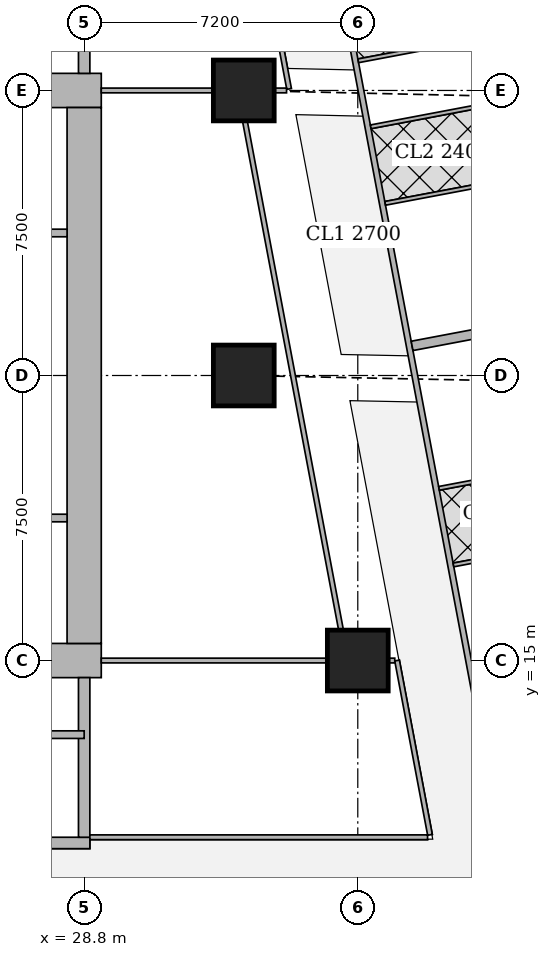
"""IFC4 building model, lengths in metres.
Left out: names, types, materials, properties, quantities, classifications, styles, units other than length and angle.
Written with IfcOpenShell. Run it as: python <this file> out.ifc"""

import sys

from ifc_helpers import new_model, si_unit, direction, frame, frame_2d, origin, origin_2d, place, context, subcontext, project, spatial, rectangle, extrude, element, fill, save


model = new_model("IFC4")
c1 = context("Model", 3, precision=1e-05, world=origin(), true_north=direction((0.0, 1.0)))
c2 = subcontext(c1, "Body", "Model", "MODEL_VIEW")
j1 = project(units=[si_unit("LENGTHUNIT", "METRE"), si_unit("PLANEANGLEUNIT", "RADIAN")], contexts=[c1])
p1 = place(None, origin())
s1 = spatial("IfcSite", under=j1, at=p1, CompositionType="ELEMENT")
p2 = place(p1, origin())
s2 = spatial("IfcBuilding", under=s1, at=p2, CompositionType="ELEMENT")
p3 = place(p2, frame((0.0, 0.0, 111.65)))
s3 = spatial("IfcBuildingStorey", under=s2, at=p3, CompositionType="ELEMENT", Elevation=111.65)
for number, where, z_axis, x_axis in (
    (1, (36.0, 15.0, 0.0), (0.0, 0.0, 1.0), (1.0, 0.0, 0.0)),
    (2, (33.0, 22.5, 0.0), (0.0, 0.0, 1.0), (1.0, 0.0, 0.0)),
    (3, (33.0, 30.0, 0.0), (0.0, 0.0, 1.0), (1.0, 0.0, 0.0)),
):
    element("IfcColumn", number, at=place(p3, frame(where, z_axis=z_axis, x_axis=x_axis)), inside=s3, PredefinedType="COLUMN", context=c2, shape_type="SweptSolid", body=[
        extrude(rectangle(XDim=1.6, YDim=1.6, at=origin_2d()), origin(), (0.0, 0.0, 1.0), 3.75),
    ])
p4 = place(p3, frame((13.95, 15.0, 0.0), z_axis=(0.0, 0.0, 1.0), x_axis=(1.0, 0.0, 0.0)))
e4 = element("IfcWall", 4, at=p4, inside=s3, PredefinedType="SHEAR", context=c2, shape_type="SweptSolid", body=[
    extrude(rectangle(XDim=15.3, YDim=0.9, at=frame_2d((7.65, 0.0))), origin(), (0.0, 0.0, 1.0), 3.75),
])
p5 = place(p4, frame((4.45, 0.0, 0.0)))
e5 = element("IfcOpeningElement", 5, at=p5, cuts=e4, PredefinedType="OPENING", context=c2, shape_type="SweptSolid", body=[
    extrude(rectangle(XDim=1.8, YDim=2.1, at=frame_2d((0.9, 1.05))), frame((0.0, 0.46, 0.0), z_axis=(0.0, -1.0, 0.0), x_axis=(1.0, 0.0, 0.0)), (0.0, 0.0, 1.0), 0.92),
])
p6 = place(p4, frame((10.7, 0.0, 0.0)))
e6 = element("IfcOpeningElement", 6, at=p6, cuts=e4, PredefinedType="OPENING", context=c2, shape_type="SweptSolid", body=[
    extrude(rectangle(XDim=1.1, YDim=2.1, at=frame_2d((0.55, 1.05))), frame((0.0, 0.46, 0.0), z_axis=(0.0, -1.0, 0.0), x_axis=(1.0, 0.0, 0.0)), (0.0, 0.0, 1.0), 0.92),
])
p7 = place(p3, frame((13.95, 30.0, 0.0), z_axis=(0.0, 0.0, 1.0), x_axis=(1.0, 0.0, 0.0)))
e7 = element("IfcWall", 7, at=p7, inside=s3, PredefinedType="SHEAR", context=c2, shape_type="SweptSolid", body=[
    extrude(rectangle(XDim=15.3, YDim=0.9, at=frame_2d((7.65, 0.0))), origin(), (0.0, 0.0, 1.0), 3.75),
])
p8 = place(p7, frame((4.45, 0.0, 0.0)))
e8 = element("IfcOpeningElement", 8, at=p8, cuts=e7, PredefinedType="OPENING", context=c2, shape_type="SweptSolid", body=[
    extrude(rectangle(XDim=1.8, YDim=2.1, at=frame_2d((0.9, 1.05))), frame((0.0, 0.46, 0.0), z_axis=(0.0, -1.0, 0.0), x_axis=(1.0, 0.0, 0.0)), (0.0, 0.0, 1.0), 0.92),
])
p9 = place(p7, frame((10.7, 0.0, 0.0)))
e9 = element("IfcOpeningElement", 9, at=p9, cuts=e7, PredefinedType="OPENING", context=c2, shape_type="SweptSolid", body=[
    extrude(rectangle(XDim=1.1, YDim=2.1, at=frame_2d((0.55, 1.05))), frame((0.0, 0.46, 0.0), z_axis=(0.0, -1.0, 0.0), x_axis=(1.0, 0.0, 0.0)), (0.0, 0.0, 1.0), 0.92),
])
p10 = place(p3, frame((28.8, 15.45, 0.0), z_axis=(0.0, 0.0, 1.0), x_axis=(0.0, 1.0, 0.0)))
e10 = element("IfcWall", 10, at=p10, inside=s3, PredefinedType="SHEAR", context=c2, shape_type="SweptSolid", body=[
    extrude(rectangle(XDim=14.1, YDim=0.9, at=frame_2d((7.05, 0.0))), origin(), (0.0, 0.0, 1.0), 3.75),
])
p11 = place(p3, frame((21.45, 10.2, 0.0), z_axis=(0.0, 0.0, 1.0), x_axis=(1.0, 0.0, 0.0)))
e11 = element("IfcWall", 11, at=p11, inside=s3, PredefinedType="SHEAR", context=c2, shape_type="SweptSolid", body=[
    extrude(rectangle(XDim=7.5, YDim=0.3, at=frame_2d((3.75, 0.0))), origin(), (0.0, 0.0, 1.0), 3.75),
])
p12 = place(p11, frame((0.5, 0.0, 0.0)))
e12 = element("IfcOpeningElement", 12, at=p12, cuts=e11, PredefinedType="OPENING", context=c2, shape_type="SweptSolid", body=[
    extrude(rectangle(XDim=1.1, YDim=2.1, at=frame_2d((0.55, 1.05))), frame((0.0, 0.16, 0.0), z_axis=(0.0, -1.0, 0.0), x_axis=(1.0, 0.0, 0.0)), (0.0, 0.0, 1.0), 0.32),
])
for number, where, z_axis, x_axis in (
    (13, (28.8, 10.35, 0.0), (0.0, 0.0, 1.0), (0.0, 1.0, 0.0)),
    (14, (28.8, 30.45, 0.0), (0.0, 0.0, 1.0), (0.0, 1.0, 0.0)),
):
    element("IfcWall", number, at=place(p3, frame(where, z_axis=z_axis, x_axis=x_axis)), inside=s3, PredefinedType="SHEAR", context=c2, shape_type="SweptSolid", body=[
        extrude(rectangle(XDim=4.2, YDim=0.3, at=frame_2d((2.1, 0.0))), origin(), (0.0, 0.0, 1.0), 3.75),
    ])
p13 = place(p3, frame((33.127, 45.65, 0.0), z_axis=(0.0, 0.0, 1.0), x_axis=(0.185598547723, -0.98262565562, 0.0)))
e15 = element("IfcWall", 15, at=p13, inside=s3, PredefinedType="SOLIDWALL", context=c2, shape_type="SweptSolid", body=[
    extrude(rectangle(XDim=47.118, YDim=0.15, at=frame_2d((23.559, 0.0))), origin(), (0.0, 0.0, 1.0), 2.2),
])
p14 = place(p13, frame((20.373, 0.0, 0.0)))
e16 = element("IfcOpeningElement", 16, at=p14, cuts=e15, PredefinedType="OPENING", context=c2, shape_type="SweptSolid", body=[
    extrude(rectangle(XDim=1.0, YDim=2.1, at=frame_2d((0.5, 1.05))), frame((0.0, 0.085, 0.0), z_axis=(0.0, -1.0, 0.0), x_axis=(1.0, 0.0, 0.0)), (0.0, 0.0, 1.0), 0.17),
])
p15 = place(p13, frame((24.188, 0.0, 0.0)))
e17 = element("IfcOpeningElement", 17, at=p15, cuts=e15, PredefinedType="OPENING", context=c2, shape_type="SweptSolid", body=[
    extrude(rectangle(XDim=1.0, YDim=2.1, at=frame_2d((0.5, 1.05))), frame((0.0, 0.085, 0.0), z_axis=(0.0, -1.0, 0.0), x_axis=(1.0, 0.0, 0.0)), (0.0, 0.0, 1.0), 0.17),
])
p16 = place(p13, frame((32.608, 0.0, 0.0)))
e18 = element("IfcOpeningElement", 18, at=p16, cuts=e15, PredefinedType="OPENING", context=c2, shape_type="SweptSolid", body=[
    extrude(rectangle(XDim=1.0, YDim=2.1, at=frame_2d((0.5, 1.05))), frame((0.0, 0.085, 0.0), z_axis=(0.0, -1.0, 0.0), x_axis=(1.0, 0.0, 0.0)), (0.0, 0.0, 1.0), 0.17),
])
p17 = place(p3, frame((38.862, 41.42, 0.0), z_axis=(0.0, 0.0, 1.0), x_axis=(0.185550092293, -0.982634806655, 0.0)))
e19 = element("IfcWall", 19, at=p17, inside=s3, PredefinedType="PARTITIONING", context=c2, shape_type="SweptSolid", body=[
    extrude(rectangle(XDim=12.384, YDim=0.1, at=frame_2d((6.192, 0.0))), origin(), (0.0, 0.0, 1.0), 2.5),
])
p18 = place(p17, frame((11.212, 0.0, 0.0)))
e20 = element("IfcOpeningElement", 20, at=p18, cuts=e19, PredefinedType="OPENING", context=c2, shape_type="SweptSolid", body=[
    extrude(rectangle(XDim=0.9, YDim=2.1, at=frame_2d((0.45, 1.05))), frame((0.0, 0.06, 0.0), z_axis=(0.0, -1.0, 0.0), x_axis=(1.0, 0.0, 0.0)), (0.0, 0.0, 1.0), 0.12),
])
p19 = place(p17, frame((7.555, 0.0, 0.0)))
e21 = element("IfcOpeningElement", 21, at=p19, cuts=e19, PredefinedType="OPENING", context=c2, shape_type="SweptSolid", body=[
    extrude(rectangle(XDim=0.9, YDim=2.1, at=frame_2d((0.45, 1.05))), frame((0.0, 0.06, 0.0), z_axis=(0.0, -1.0, 0.0), x_axis=(1.0, 0.0, 0.0)), (0.0, 0.0, 1.0), 0.12),
])
p20 = place(p17, frame((3.579, 0.0, 0.0)))
e22 = element("IfcOpeningElement", 22, at=p20, cuts=e19, PredefinedType="OPENING", context=c2, shape_type="SweptSolid", body=[
    extrude(rectangle(XDim=0.9, YDim=2.1, at=frame_2d((0.45, 1.05))), frame((0.0, 0.06, 0.0), z_axis=(0.0, -1.0, 0.0), x_axis=(1.0, 0.0, 0.0)), (0.0, 0.0, 1.0), 0.12),
])
p21 = place(p3, frame((37.473, 42.309, 0.0), z_axis=(0.0, 0.0, 1.0), x_axis=(0.185583982986, -0.982628406499, 0.0)))
e23 = element("IfcWall", 23, at=p21, inside=s3, PredefinedType="PARTITIONING", context=c2, shape_type="SweptSolid", body=[
    extrude(rectangle(XDim=14.825, YDim=0.1, at=frame_2d((7.412, 0.0))), origin(), (0.0, 0.0, 1.0), 2.5),
])
p22 = place(p21, frame((13.4, 0.0, 0.0)))
e24 = element("IfcOpeningElement", 24, at=p22, cuts=e23, PredefinedType="OPENING", context=c2, shape_type="SweptSolid", body=[
    extrude(rectangle(XDim=0.9, YDim=2.1, at=frame_2d((0.45, 1.05))), frame((0.0, 0.06, 0.0), z_axis=(0.0, -1.0, 0.0), x_axis=(1.0, 0.0, 0.0)), (0.0, 0.0, 1.0), 0.12),
])
p23 = place(p21, frame((9.808, 0.0, 0.0)))
e25 = element("IfcOpeningElement", 25, at=p23, cuts=e23, PredefinedType="OPENING", context=c2, shape_type="SweptSolid", body=[
    extrude(rectangle(XDim=0.9, YDim=2.1, at=frame_2d((0.45, 1.05))), frame((0.0, 0.06, 0.0), z_axis=(0.0, -1.0, 0.0), x_axis=(1.0, 0.0, 0.0)), (0.0, 0.0, 1.0), 0.12),
])
p24 = place(p21, frame((5.397, 0.0, 0.0)))
e26 = element("IfcOpeningElement", 26, at=p24, cuts=e23, PredefinedType="OPENING", context=c2, shape_type="SweptSolid", body=[
    extrude(rectangle(XDim=0.9, YDim=2.1, at=frame_2d((0.45, 1.05))), frame((0.0, 0.06, 0.0), z_axis=(0.0, -1.0, 0.0), x_axis=(1.0, 0.0, 0.0)), (0.0, 0.0, 1.0), 0.12),
])
p25 = place(p21, frame((2.853, 0.0, 0.0)))
e27 = element("IfcOpeningElement", 27, at=p25, cuts=e23, PredefinedType="OPENING", context=c2, shape_type="SweptSolid", body=[
    extrude(rectangle(XDim=0.9, YDim=2.1, at=frame_2d((0.45, 1.05))), frame((0.0, 0.06, 0.0), z_axis=(0.0, -1.0, 0.0), x_axis=(1.0, 0.0, 0.0)), (0.0, 0.0, 1.0), 0.12),
])
p26 = place(p21, frame((11.491, 0.0, 0.0)))
e28 = element("IfcOpeningElement", 28, at=p26, cuts=e23, PredefinedType="OPENING", context=c2, shape_type="SweptSolid", body=[
    extrude(rectangle(XDim=0.9, YDim=2.1, at=frame_2d((0.45, 1.05))), frame((0.0, 0.06, 0.0), z_axis=(0.0, -1.0, 0.0), x_axis=(1.0, 0.0, 0.0)), (0.0, 0.0, 1.0), 0.12),
])
p27 = place(p21, frame((7.9, 0.0, 0.0)))
e29 = element("IfcOpeningElement", 29, at=p27, cuts=e23, PredefinedType="OPENING", context=c2, shape_type="SweptSolid", body=[
    extrude(rectangle(XDim=0.9, YDim=2.1, at=frame_2d((0.45, 1.05))), frame((0.0, 0.06, 0.0), z_axis=(0.0, -1.0, 0.0), x_axis=(1.0, 0.0, 0.0)), (0.0, 0.0, 1.0), 0.12),
])
p28 = place(p3, frame((39.476, 31.434, 0.0), z_axis=(0.0, 0.0, 1.0), x_axis=(-0.982638553676, -0.185530247748, 0.0)))
e30 = element("IfcWall", 30, at=p28, inside=s3, PredefinedType="PARTITIONING", context=c2, shape_type="SweptSolid", body=[
    extrude(rectangle(XDim=3.525, YDim=0.1, at=frame_2d((1.763, 0.0))), origin(), (0.0, 0.0, 1.0), 3.5),
])
p29 = place(p3, frame((40.233, 27.693, 0.0), z_axis=(0.0, 0.0, 1.0), x_axis=(-0.982598214409, -0.185743772548, 0.0)))
e31 = element("IfcWall", 31, at=p29, inside=s3, PredefinedType="PARTITIONING", context=c2, shape_type="SweptSolid", body=[
    extrude(rectangle(XDim=3.575, YDim=0.1, at=frame_2d((1.788, 0.0))), origin(), (0.0, 0.0, 1.0), 3.5),
])
p30 = place(p3, frame((39.803, 29.698, 0.0), z_axis=(0.0, 0.0, 1.0), x_axis=(-0.982576058723, -0.185860939478, 0.0)))
e32 = element("IfcWall", 32, at=p30, inside=s3, PredefinedType="PARTITIONING", context=c2, shape_type="SweptSolid", body=[
    extrude(rectangle(XDim=3.524, YDim=0.1, at=frame_2d((1.762, 0.0))), origin(), (0.0, 0.0, 1.0), 2.5),
])
p31 = place(p3, frame((41.601, 20.184, 0.0), z_axis=(0.0, 0.0, 1.0), x_axis=(-0.982638553676, -0.185530247748, 0.0)))
e33 = element("IfcWall", 33, at=p31, inside=s3, PredefinedType="PARTITIONING", context=c2, shape_type="SweptSolid", body=[
    extrude(rectangle(XDim=3.525, YDim=0.1, at=frame_2d((1.763, 0.0))), origin(), (0.0, 0.0, 1.0), 3.5),
])
p32 = place(p3, frame((41.981, 18.17, 0.0), z_axis=(0.0, 0.0, 1.0), x_axis=(-0.982585626838, -0.185810349366, 0.0)))
e34 = element("IfcWall", 34, at=p32, inside=s3, PredefinedType="PARTITIONING", context=c2, shape_type="SweptSolid", body=[
    extrude(rectangle(XDim=3.525, YDim=0.1, at=frame_2d((1.763, 0.0))), origin(), (0.0, 0.0, 1.0), 3.5),
])
p33 = place(p3, frame((42.121, 24.166, 0.0), z_axis=(0.0, 0.0, 1.0), x_axis=(-0.98259850169, -0.185742252804, 0.0)))
e35 = element("IfcWall", 35, at=p33, inside=s3, PredefinedType="SOLIDWALL", context=c2, shape_type="SweptSolid", body=[
    extrude(rectangle(XDim=4.775, YDim=0.25, at=frame_2d((2.388, 0.0))), origin(), (0.0, 0.0, 1.0), 3.5),
])
p34 = place(p3, frame((28.95, 10.35, 0.0), z_axis=(0.0, 0.0, 1.0), x_axis=(1.0, 0.0, 0.0)))
e36 = element("IfcWall", 36, at=p34, inside=s3, PredefinedType="PARTITIONING", context=c2, shape_type="SweptSolid", body=[
    extrude(rectangle(XDim=8.886, YDim=0.125, at=frame_2d((4.443, 0.0))), origin(), (0.0, 0.0, 1.0), 3.5),
])
p35 = place(p3, frame((37.9, 10.413, 0.0), z_axis=(0.0, 0.0, 1.0), x_axis=(-0.185513629891, 0.982641691119, 0.0)))
e37 = element("IfcWall", 37, at=p35, inside=s3, PredefinedType="PARTITIONING", context=c2, shape_type="SweptSolid", body=[
    extrude(rectangle(XDim=4.668, YDim=0.125, at=frame_2d((2.334, 0.0))), origin(), (0.0, 0.0, 1.0), 3.5),
])
p36 = place(p35, frame((0.708, 0.0, 0.0)))
e38 = element("IfcOpeningElement", 38, at=p36, cuts=e37, PredefinedType="OPENING", context=c2, shape_type="SweptSolid", body=[
    extrude(rectangle(XDim=1.0, YDim=2.1, at=frame_2d((0.5, 1.05))), frame((0.0, 0.073, 0.0), z_axis=(0.0, -1.0, 0.0), x_axis=(1.0, 0.0, 0.0)), (0.0, 0.0, 1.0), 0.145),
])
p37 = place(p3, frame((34.193, 30.04, 0.0), z_axis=(0.0, 0.0, 1.0), x_axis=(-0.185626015863, 0.982620467034, 0.0)))
e39 = element("IfcWall", 39, at=p37, inside=s3, PredefinedType="PARTITIONING", context=c2, shape_type="SweptSolid", body=[
    extrude(rectangle(XDim=4.628, YDim=0.125, at=frame_2d((2.314, 0.0))), origin(), (0.0, 0.0, 1.0), 2.5),
])
p38 = place(p37, frame((1.05, 0.0, 0.0)))
e40 = element("IfcOpeningElement", 40, at=p38, cuts=e39, PredefinedType="OPENING", context=c2, shape_type="SweptSolid", body=[
    extrude(rectangle(XDim=1.0, YDim=2.1, at=frame_2d((0.5, 1.05))), frame((0.0, 0.073, 0.0), z_axis=(0.0, -1.0, 0.0), x_axis=(1.0, 0.0, 0.0)), (0.0, 0.0, 1.0), 0.145),
])
p39 = place(p37, frame((3.225, 0.0, 0.0)))
e41 = element("IfcOpeningElement", 41, at=p39, cuts=e39, PredefinedType="OPENING", context=c2, shape_type="SweptSolid", body=[
    extrude(rectangle(XDim=1.0, YDim=2.1, at=frame_2d((0.5, 1.05))), frame((0.0, 0.073, 0.0), z_axis=(0.0, -1.0, 0.0), x_axis=(1.0, 0.0, 0.0)), (0.0, 0.0, 1.0), 0.145),
])
p40 = place(p3, frame((35.557, 15.813, 0.0), z_axis=(0.0, 0.0, 1.0), x_axis=(-0.185583681679, 0.982628463405, 0.0)))
e42 = element("IfcWall", 42, at=p40, inside=s3, PredefinedType="PARTITIONING", context=c2, shape_type="SweptSolid", body=[
    extrude(rectangle(XDim=13.61, YDim=0.125, at=frame_2d((6.805, 0.0))), origin(), (0.0, 0.0, 1.0), 2.5),
])
p41 = place(p40, frame((5.1, 0.0, 0.0)))
e43 = element("IfcOpeningElement", 43, at=p41, cuts=e42, PredefinedType="OPENING", context=c2, shape_type="SweptSolid", body=[
    extrude(rectangle(XDim=1.0, YDim=2.1, at=frame_2d((0.5, 1.05))), frame((0.0, 0.073, 0.0), z_axis=(0.0, -1.0, 0.0), x_axis=(1.0, 0.0, 0.0)), (0.0, 0.0, 1.0), 0.145),
])
p42 = place(p3, frame((29.25, 15.0, 0.0), z_axis=(0.0, 0.0, 1.0), x_axis=(1.0, 0.0, 0.0)))
e44 = element("IfcWall", 44, at=p42, inside=s3, PredefinedType="PARTITIONING", context=c2, shape_type="SweptSolid", body=[
    extrude(rectangle(XDim=5.949, YDim=0.125, at=frame_2d((2.975, 0.0))), origin(), (0.0, 0.0, 1.0), 3.5),
])
p43 = place(p3, frame((36.801, 15.0, 0.0), z_axis=(0.0, 0.0, 1.0), x_axis=(1.0, 0.0, 0.0)))
e45 = element("IfcWall", 45, at=p43, inside=s3, PredefinedType="PARTITIONING", context=c2, shape_type="SweptSolid", body=[
    extrude(rectangle(XDim=0.172, YDim=0.125, at=frame_2d((0.086, 0.0))), origin(), (0.0, 0.0, 1.0), 3.5),
])
p44 = place(p3, frame((29.25, 30.0, 0.0), z_axis=(0.0, 0.0, 1.0), x_axis=(1.0, 0.0, 0.0)))
e46 = element("IfcWall", 46, at=p44, inside=s3, PredefinedType="PARTITIONING", context=c2, shape_type="SweptSolid", body=[
    extrude(rectangle(XDim=2.949, YDim=0.125, at=frame_2d((1.475, 0.0))), origin(), (0.0, 0.0, 1.0), 3.5),
])
p45 = place(p3, frame((33.801, 30.0, 0.0), z_axis=(0.0, 0.0, 1.0), x_axis=(1.0, 0.0, 0.0)))
e47 = element("IfcWall", 47, at=p45, inside=s3, PredefinedType="PARTITIONING", context=c2, shape_type="SweptSolid", body=[
    extrude(rectangle(XDim=0.324, YDim=0.125, at=frame_2d((0.162, 0.0))), origin(), (0.0, 0.0, 1.0), 2.5),
])
p46 = place(p3, frame((23.0, 13.05, 0.0), z_axis=(0.0, 0.0, 1.0), x_axis=(1.0, 0.0, 0.0)))
e48 = element("IfcWall", 48, at=p46, inside=s3, PredefinedType="SHEAR", context=c2, shape_type="SweptSolid", body=[
    extrude(rectangle(XDim=5.8, YDim=0.2, at=frame_2d((2.9, 0.0))), origin(), (0.0, 0.0, 1.0), 3.75),
])
for number, where, z_axis, x_axis in (
    (49, (27.4, 18.75, 0.0), (0.0, 0.0, 1.0), (1.0, 0.0, 0.0)),
    (50, (27.4, 26.25, 0.0), (0.0, 0.0, 1.0), (1.0, 0.0, 0.0)),
):
    element("IfcWall", number, at=place(p3, frame(where, z_axis=z_axis, x_axis=x_axis)), inside=s3, PredefinedType="SOLIDWALL", context=c2, shape_type="SweptSolid", body=[
        extrude(rectangle(XDim=0.95, YDim=0.2, at=frame_2d((0.475, 0.0))), origin(), (0.0, 0.0, 1.0), 3.5),
    ])
p47 = place(p14, origin())
e51 = element("IfcDoor", 51, at=p47, inside=s3, OperationType="SINGLE_SWING_LEFT", PredefinedType="DOOR", context=c2, shape_type="SweptSolid", body=[
    extrude(rectangle(XDim=1.0, YDim=2.1, at=frame_2d((0.5, 1.05))), frame((0.0, 0.025, 0.0), z_axis=(0.0, -1.0, 0.0), x_axis=(1.0, 0.0, 0.0)), (0.0, 0.0, 1.0), 0.05),
])
fill(e16, e51)
p48 = place(p15, origin())
e52 = element("IfcDoor", 52, at=p48, inside=s3, OperationType="SINGLE_SWING_RIGHT", PredefinedType="DOOR", context=c2, shape_type="SweptSolid", body=[
    extrude(rectangle(XDim=1.0, YDim=2.1, at=frame_2d((0.5, 1.05))), frame((0.0, 0.025, 0.0), z_axis=(0.0, -1.0, 0.0), x_axis=(1.0, 0.0, 0.0)), (0.0, 0.0, 1.0), 0.05),
])
fill(e17, e52)
p49 = place(p36, origin())
e53 = element("IfcDoor", 53, at=p49, inside=s3, OperationType="SINGLE_SWING_LEFT", PredefinedType="DOOR", context=c2, shape_type="SweptSolid", body=[
    extrude(rectangle(XDim=1.0, YDim=2.1, at=frame_2d((0.5, 1.05))), frame((0.0, 0.025, 0.0), z_axis=(0.0, -1.0, 0.0), x_axis=(1.0, 0.0, 0.0)), (0.0, 0.0, 1.0), 0.05),
])
fill(e38, e53)
p50 = place(p41, origin())
e54 = element("IfcDoor", 54, at=p50, inside=s3, OperationType="SINGLE_SWING_LEFT", PredefinedType="DOOR", context=c2, shape_type="SweptSolid", body=[
    extrude(rectangle(XDim=1.0, YDim=2.1, at=frame_2d((0.5, 1.05))), frame((0.0, 0.025, 0.0), z_axis=(0.0, -1.0, 0.0), x_axis=(1.0, 0.0, 0.0)), (0.0, 0.0, 1.0), 0.05),
])
fill(e43, e54)
save(model, sys.argv[1])
